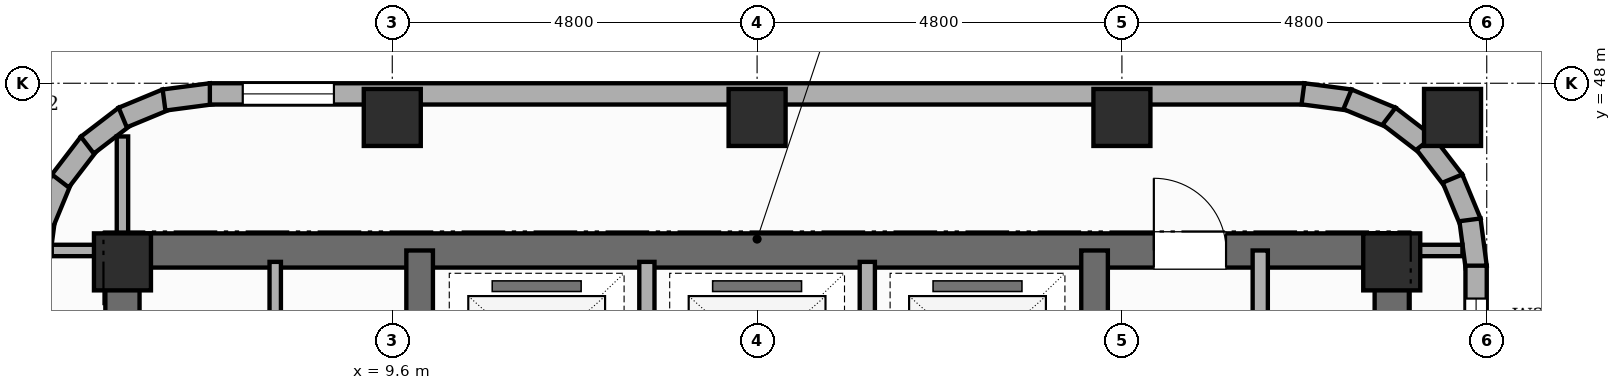
"""IFC4 building model, lengths in metres.
Left out: names, types, materials, properties, quantities, classifications, styles, units other than length and angle.
Written with IfcOpenShell. Run it as: python <this file> out.ifc"""

import sys

from ifc_helpers import new_model, si_unit, direction, frame, frame_2d, origin, origin_2d, place, context, subcontext, project, spatial, rectangle, extrude, element, fill, save


model = new_model("IFC4")
c1 = context("Model", 3, precision=1e-05, world=origin(), true_north=direction((0.0, 1.0)))
c2 = subcontext(c1, "Body", "Model", "MODEL_VIEW")
j1 = project(units=[si_unit("LENGTHUNIT", "METRE"), si_unit("PLANEANGLEUNIT", "RADIAN")], contexts=[c1])
p1 = place(None, origin())
s1 = spatial("IfcSite", under=j1, at=p1, CompositionType="ELEMENT")
p2 = place(p1, origin())
s2 = spatial("IfcBuilding", under=s1, at=p2, CompositionType="ELEMENT")
p3 = place(p2, frame((0.0, 0.0, 265.6)))
s3 = spatial("IfcBuildingStorey", under=s2, at=p3, CompositionType="ELEMENT", Elevation=265.6)
p4 = place(p3, frame((6.05, 30.675, 0.0), z_axis=(0.0, 0.0, 1.0), x_axis=(0.0, 1.0, 0.0)))
e1 = element("IfcWall", 1, at=p4, inside=s3, PredefinedType="SHEAR", context=c2, shape_type="SweptSolid", body=[
    extrude(rectangle(XDim=15.35, YDim=0.45, at=frame_2d((7.675, 0.0))), origin(), (0.0, 0.0, 1.0), 4.3),
])
p5 = place(p4, frame((10.675, 0.0, 0.0)))
e2 = element("IfcOpeningElement", 2, at=p5, cuts=e1, PredefinedType="OPENING", context=c2, shape_type="SweptSolid", body=[
    extrude(rectangle(XDim=0.95, YDim=2.15, at=frame_2d((0.475, 1.075))), frame((0.0, 0.235, 0.0), z_axis=(0.0, -1.0, 0.0), x_axis=(1.0, 0.0, 0.0)), (0.0, 0.0, 1.0), 0.47),
])
p6 = place(p3, frame((22.75, 30.675, 0.0), z_axis=(0.0, 0.0, 1.0), x_axis=(0.0, 1.0, 0.0)))
e3 = element("IfcWall", 3, at=p6, inside=s3, PredefinedType="SHEAR", context=c2, shape_type="SweptSolid", body=[
    extrude(rectangle(XDim=15.35, YDim=0.45, at=frame_2d((7.675, 0.0))), origin(), (0.0, 0.0, 1.0), 4.3),
])
p7 = place(p6, frame((10.675, 0.0, 0.0)))
e4 = element("IfcOpeningElement", 4, at=p7, cuts=e3, PredefinedType="OPENING", context=c2, shape_type="SweptSolid", body=[
    extrude(rectangle(XDim=1.0, YDim=2.15, at=frame_2d((0.5, 1.075))), frame((0.0, 0.235, 0.0), z_axis=(0.0, -1.0, 0.0), x_axis=(1.0, 0.0, 0.0)), (0.0, 0.0, 1.0), 0.47),
])
p8 = place(p3, frame((6.05, 45.8, 0.0), z_axis=(0.0, 0.0, 1.0), x_axis=(1.0, 0.0, 0.0)))
e5 = element("IfcWall", 5, at=p8, inside=s3, PredefinedType="SHEAR", context=c2, shape_type="SweptSolid", body=[
    extrude(rectangle(XDim=16.7, YDim=0.45, at=frame_2d((8.35, 0.0))), origin(), (0.0, 0.0, 1.0), 4.3),
])
p9 = place(p8, frame((13.57, 0.0, 0.0)))
e6 = element("IfcOpeningElement", 6, at=p9, cuts=e5, PredefinedType="OPENING", context=c2, shape_type="SweptSolid", body=[
    extrude(rectangle(XDim=0.95, YDim=2.15, at=frame_2d((0.475, 1.075))), frame((0.0, 0.235, 0.0), z_axis=(0.0, -1.0, 0.0), x_axis=(1.0, 0.0, 0.0)), (0.0, 0.0, 1.0), 0.47),
])
p10 = place(p3, frame((9.96, 30.9, 0.0), z_axis=(0.0, 0.0, 1.0), x_axis=(0.0, 1.0, 0.0)))
e7 = element("IfcWall", 7, at=p10, inside=s3, PredefinedType="SHEAR", context=c2, shape_type="SweptSolid", body=[
    extrude(rectangle(XDim=14.9, YDim=0.35, at=frame_2d((7.45, 0.0))), origin(), (0.0, 0.0, 1.0), 4.3),
])
p11 = place(p10, frame((0.65, 0.0, 0.0)))
e8 = element("IfcOpeningElement", 8, at=p11, cuts=e7, PredefinedType="OPENING", context=c2, shape_type="SweptSolid", body=[
    extrude(rectangle(XDim=0.95, YDim=2.1, at=frame_2d((0.475, 1.05))), frame((0.0, 0.185, 0.0), z_axis=(0.0, -1.0, 0.0), x_axis=(1.0, 0.0, 0.0)), (0.0, 0.0, 1.0), 0.37),
])
p12 = place(p10, frame((10.45, 0.0, 0.0)))
e9 = element("IfcOpeningElement", 9, at=p12, cuts=e7, PredefinedType="OPENING", context=c2, shape_type="SweptSolid", body=[
    extrude(rectangle(XDim=1.0, YDim=2.15, at=frame_2d((0.5, 1.075))), frame((0.0, 0.185, 0.0), z_axis=(0.0, -1.0, 0.0), x_axis=(1.0, 0.0, 0.0)), (0.0, 0.0, 1.0), 0.37),
])
p13 = place(p3, frame((18.84, 30.9, 0.0), z_axis=(0.0, 0.0, 1.0), x_axis=(0.0, 1.0, 0.0)))
e10 = element("IfcWall", 10, at=p13, inside=s3, PredefinedType="SHEAR", context=c2, shape_type="SweptSolid", body=[
    extrude(rectangle(XDim=14.9, YDim=0.35, at=frame_2d((7.45, 0.0))), origin(), (0.0, 0.0, 1.0), 4.3),
])
p14 = place(p13, frame((0.65, 0.0, 0.0)))
e11 = element("IfcOpeningElement", 11, at=p14, cuts=e10, PredefinedType="OPENING", context=c2, shape_type="SweptSolid", body=[
    extrude(rectangle(XDim=0.95, YDim=2.1, at=frame_2d((0.475, 1.05))), frame((0.0, 0.185, 0.0), z_axis=(0.0, -1.0, 0.0), x_axis=(1.0, 0.0, 0.0)), (0.0, 0.0, 1.0), 0.37),
])
p15 = place(p13, frame((10.45, 0.0, 0.0)))
e12 = element("IfcOpeningElement", 12, at=p15, cuts=e10, PredefinedType="OPENING", context=c2, shape_type="SweptSolid", body=[
    extrude(rectangle(XDim=1.0, YDim=2.15, at=frame_2d((0.5, 1.075))), frame((0.0, 0.185, 0.0), z_axis=(0.0, -1.0, 0.0), x_axis=(1.0, 0.0, 0.0)), (0.0, 0.0, 1.0), 0.37),
])
for number, where, z_axis, x_axis in (
    (13, (6.05, 45.65, 0.0), (0.0, 0.0, 1.0), (1.0, 0.0, 0.0)),
    (14, (9.6, 47.55, 0.0), (0.0, 0.0, 1.0), (1.0, 0.0, 0.0)),
    (15, (14.4, 47.55, 0.0), (0.0, 0.0, 1.0), (1.0, 0.0, 0.0)),
    (16, (19.2, 47.55, 0.0), (0.0, 0.0, 1.0), (1.0, 0.0, 0.0)),
    (17, (22.75, 45.65, 0.0), (0.0, 0.0, 1.0), (1.0, 0.0, 0.0)),
    (18, (23.55, 47.55, 0.0), (0.0, 0.0, 1.0), (1.0, 0.0, 0.0)),
):
    element("IfcColumn", number, at=place(p3, frame(where, z_axis=z_axis, x_axis=x_axis)), inside=s3, PredefinedType="COLUMN", context=c2, shape_type="SweptSolid", body=[
        extrude(rectangle(XDim=0.75, YDim=0.75, at=origin_2d()), origin(), (0.0, 0.0, 1.0), 4.3),
    ])
for number, where, z_axis, x_axis in (
    (19, (4.939, 45.582, 0.0), (0.0, 0.0, 1.0), (0.131, 0.991, 0.0)),
    (20, (5.011, 46.167, 0.0), (0.0, 0.0, 1.0), (0.383, 0.924, 0.0)),
    (21, (5.233, 46.715, 0.0), (0.0, 0.0, 1.0), (0.609, 0.793, 0.0)),
    (22, (5.588, 47.186, 0.0), (0.0, 0.0, 1.0), (0.793, 0.609, 0.0)),
):
    element("IfcWall", number, at=place(p3, frame(where, z_axis=z_axis, x_axis=x_axis)), inside=s3, PredefinedType="STANDARD", context=c2, shape_type="SweptSolid", body=[
        extrude(rectangle(XDim=0.626, YDim=0.28, at=frame_2d((0.313, 0.0))), origin(), (0.0, 0.0, 1.0), 4.04),
    ])
p16 = place(p3, frame((6.054, 47.549, 0.0), z_axis=(0.0, 0.0, 1.0), x_axis=(0.923974080304, 0.382455093999, 0.0)))
e23 = element("IfcWall", 23, at=p16, inside=s3, PredefinedType="STANDARD", context=c2, shape_type="SweptSolid", body=[
    extrude(rectangle(XDim=0.626, YDim=0.28, at=frame_2d((0.313, 0.0))), origin(), (0.0, 0.0, 1.0), 4.04),
])
p17 = place(p3, frame((6.597, 47.779, 0.0), z_axis=(0.0, 0.0, 1.0), x_axis=(0.9914410257, 0.130555323746, 0.0)))
e24 = element("IfcWall", 24, at=p17, inside=s3, PredefinedType="STANDARD", context=c2, shape_type="SweptSolid", body=[
    extrude(rectangle(XDim=0.626, YDim=0.28, at=frame_2d((0.313, 0.0))), origin(), (0.0, 0.0, 1.0), 4.04),
])
p18 = place(p3, frame((7.2, 47.86, 0.0), z_axis=(0.0, 0.0, 1.0), x_axis=(1.0, 0.0, 0.0)))
e25 = element("IfcWall", 25, at=p18, inside=s3, PredefinedType="STANDARD", context=c2, shape_type="SweptSolid", body=[
    extrude(rectangle(XDim=14.4, YDim=0.28, at=frame_2d((7.2, 0.0))), origin(), (0.0, 0.0, 1.0), 3.32),
])
p19 = place(p18, frame((0.433, 0.0, 0.8)))
e26 = element("IfcOpeningElement", 26, at=p19, cuts=e25, PredefinedType="OPENING", context=c2, shape_type="SweptSolid", body=[
    extrude(rectangle(XDim=1.2, YDim=1.8, at=frame_2d((0.6, 0.9))), frame((0.0, 0.15, 0.0), z_axis=(0.0, -1.0, 0.0), x_axis=(1.0, 0.0, 0.0)), (0.0, 0.0, 1.0), 0.3),
])
for number, where, z_axis, x_axis in (
    (27, (21.582, 47.861, 0.0), (0.0, 0.0, 1.0), (0.991, -0.131, 0.0)),
    (28, (22.167, 47.789, 0.0), (0.0, 0.0, 1.0), (0.924, -0.382, 0.0)),
    (29, (22.715, 47.567, 0.0), (0.0, 0.0, 1.0), (0.793, -0.609, 0.0)),
    (30, (23.186, 47.212, 0.0), (0.0, 0.0, 1.0), (0.609, -0.793, 0.0)),
    (31, (23.549, 46.746, 0.0), (0.0, 0.0, 1.0), (0.382, -0.924, 0.0)),
    (32, (23.779, 46.203, 0.0), (0.0, 0.0, 1.0), (0.131, -0.991, 0.0)),
):
    element("IfcWall", number, at=place(p3, frame(where, z_axis=z_axis, x_axis=x_axis)), inside=s3, PredefinedType="STANDARD", context=c2, shape_type="SweptSolid", body=[
        extrude(rectangle(XDim=0.626, YDim=0.28, at=frame_2d((0.313, 0.0))), origin(), (0.0, 0.0, 1.0), 3.32),
    ])
p20 = place(p3, frame((23.86, 45.6, 0.0), z_axis=(0.0, 0.0, 1.0), x_axis=(0.0, -1.0, 0.0)))
e33 = element("IfcWall", 33, at=p20, inside=s3, PredefinedType="STANDARD", context=c2, shape_type="SweptSolid", body=[
    extrude(rectangle(XDim=32.4, YDim=0.28, at=frame_2d((16.2, 0.0))), origin(), (0.0, 0.0, 1.0), 3.32),
])
p21 = place(p20, frame((28.5, 0.0, 0.0)))
e34 = element("IfcOpeningElement", 34, at=p21, cuts=e33, PredefinedType="OPENING", context=c2, shape_type="SweptSolid", body=[
    extrude(rectangle(XDim=1.1, YDim=2.15, at=frame_2d((0.55, 1.075))), frame((0.0, 0.15, 0.0), z_axis=(0.0, -1.0, 0.0), x_axis=(1.0, 0.0, 0.0)), (0.0, 0.0, 1.0), 0.3),
])
p22 = place(p20, frame((29.95, 0.0, 0.45)))
e35 = element("IfcOpeningElement", 35, at=p22, cuts=e33, PredefinedType="OPENING", context=c2, shape_type="SweptSolid", body=[
    extrude(rectangle(XDim=0.6, YDim=1.8, at=frame_2d((0.3, 0.9))), frame((0.0, 0.15, 0.0), z_axis=(0.0, -1.0, 0.0), x_axis=(1.0, 0.0, 0.0)), (0.0, 0.0, 1.0), 0.3),
])
p23 = place(p20, frame((22.829, 0.0, 0.8)))
e36 = element("IfcOpeningElement", 36, at=p23, cuts=e33, PredefinedType="OPENING", context=c2, shape_type="SweptSolid", body=[
    extrude(rectangle(XDim=2.05, YDim=1.95, at=frame_2d((1.025, 0.975))), frame((0.0, 0.15, 0.0), z_axis=(0.0, -1.0, 0.0), x_axis=(1.0, 0.0, 0.0)), (0.0, 0.0, 1.0), 0.3),
])
p24 = place(p20, frame((0.433, 0.0, 0.8)))
e37 = element("IfcOpeningElement", 37, at=p24, cuts=e33, PredefinedType="OPENING", context=c2, shape_type="SweptSolid", body=[
    extrude(rectangle(XDim=1.2, YDim=1.8, at=frame_2d((0.6, 0.9))), frame((0.0, 0.15, 0.0), z_axis=(0.0, -1.0, 0.0), x_axis=(1.0, 0.0, 0.0)), (0.0, 0.0, 1.0), 0.3),
])
p25 = place(p20, frame((27.076, 0.0, 0.45)))
e38 = element("IfcOpeningElement", 38, at=p25, cuts=e33, PredefinedType="OPENING", context=c2, shape_type="SweptSolid", body=[
    extrude(rectangle(XDim=0.75, YDim=1.8, at=frame_2d((0.375, 0.9))), frame((0.0, 0.15, 0.0), z_axis=(0.0, -1.0, 0.0), x_axis=(1.0, 0.0, 0.0)), (0.0, 0.0, 1.0), 0.3),
])
p26 = place(p20, frame((20.167, 0.0, 0.45)))
e39 = element("IfcOpeningElement", 39, at=p26, cuts=e33, PredefinedType="OPENING", context=c2, shape_type="SweptSolid", body=[
    extrude(rectangle(XDim=0.75, YDim=1.8, at=frame_2d((0.375, 0.9))), frame((0.0, 0.15, 0.0), z_axis=(0.0, -1.0, 0.0), x_axis=(1.0, 0.0, 0.0)), (0.0, 0.0, 1.0), 0.3),
])
p27 = place(p3, frame((21.02, 43.05, 0.0), z_axis=(0.0, 0.0, 1.0), x_axis=(0.0, 1.0, 0.0)))
e40 = element("IfcWall", 40, at=p27, inside=s3, PredefinedType="POLYGONAL", context=c2, shape_type="SweptSolid", body=[
    extrude(rectangle(XDim=2.75, YDim=0.2, at=frame_2d((1.375, 0.0))), origin(), (0.0, 0.0, 1.0), 4.04),
])
p28 = place(p27, frame((0.7, 0.0, 0.0)))
e41 = element("IfcOpeningElement", 41, at=p28, cuts=e40, PredefinedType="OPENING", context=c2, shape_type="SweptSolid", body=[
    extrude(rectangle(XDim=0.86, YDim=2.1, at=frame_2d((0.43, 1.05))), frame((0.0, 0.11, 0.0), z_axis=(0.0, -1.0, 0.0), x_axis=(1.0, 0.0, 0.0)), (0.0, 0.0, 1.0), 0.22),
])
for number, where, z_axis, x_axis in (
    (42, (12.95, 43.1, 0.0), (0.0, 0.0, 1.0), (0.0, 1.0, 0.0)),
    (43, (15.85, 43.1, 0.0), (0.0, 0.0, 1.0), (0.0, 1.0, 0.0)),
):
    element("IfcWall", number, at=place(p3, frame(where, z_axis=z_axis, x_axis=x_axis)), inside=s3, PredefinedType="POLYGONAL", context=c2, shape_type="SweptSolid", body=[
        extrude(rectangle(XDim=2.55, YDim=0.2, at=frame_2d((1.275, 0.0))), origin(), (0.0, 0.0, 1.0), 4.04),
    ])
p29 = place(p3, frame((8.06, 43.05, 0.0), z_axis=(0.0, 0.0, 1.0), x_axis=(0.0, 1.0, 0.0)))
e44 = element("IfcWall", 44, at=p29, inside=s3, PredefinedType="PARTITIONING", context=c2, shape_type="SweptSolid", body=[
    extrude(rectangle(XDim=2.6, YDim=0.15, at=frame_2d((1.3, 0.0))), origin(), (0.0, 0.0, 1.0), 4.04),
])
p30 = place(p3, frame((5.12, 45.8, 0.0), z_axis=(0.0, 0.0, 1.0), x_axis=(1.0, 0.0, 0.0)))
e45 = element("IfcWall", 45, at=p30, inside=s3, PredefinedType="PARTITIONING", context=c2, shape_type="SweptSolid", body=[
    extrude(rectangle(XDim=0.93, YDim=0.15, at=frame_2d((0.465, 0.0))), origin(), (0.0, 0.0, 1.0), 4.04),
])
p31 = place(p3, frame((6.05, 45.8, 0.0), z_axis=(0.0, 0.0, 1.0), x_axis=(0.0, 1.0, 0.0)))
e46 = element("IfcWall", 46, at=p31, inside=s3, PredefinedType="PARTITIONING", context=c2, shape_type="SweptSolid", body=[
    extrude(rectangle(XDim=1.5, YDim=0.15, at=frame_2d((0.75, 0.0))), origin(), (0.0, 0.0, 1.0), 4.04),
])
p32 = place(p3, frame((22.75, 45.8, 0.0), z_axis=(0.0, 0.0, 1.0), x_axis=(1.0, 0.0, 0.0)))
e47 = element("IfcWall", 47, at=p32, inside=s3, PredefinedType="PARTITIONING", context=c2, shape_type="SweptSolid", body=[
    extrude(rectangle(XDim=0.93, YDim=0.15, at=frame_2d((0.465, 0.0))), origin(), (0.0, 0.0, 1.0), 4.04),
])
p33 = place(p19, origin())
e48 = element("IfcWindow", 48, at=p33, inside=s3, PartitioningType="SINGLE_PANEL", PredefinedType="WINDOW", context=c2, shape_type="SweptSolid", body=[
    extrude(rectangle(XDim=1.2, YDim=1.8, at=frame_2d((0.6, 0.9))), frame((0.0, 0.03, 0.0), z_axis=(0.0, -1.0, 0.0), x_axis=(1.0, 0.0, 0.0)), (0.0, 0.0, 1.0), 0.06),
])
fill(e26, e48)
p34 = place(p24, origin())
e49 = element("IfcWindow", 49, at=p34, inside=s3, PartitioningType="SINGLE_PANEL", PredefinedType="WINDOW", context=c2, shape_type="SweptSolid", body=[
    extrude(rectangle(XDim=1.2, YDim=1.8, at=frame_2d((0.6, 0.9))), frame((0.0, 0.03, 0.0), z_axis=(0.0, -1.0, 0.0), x_axis=(1.0, 0.0, 0.0)), (0.0, 0.0, 1.0), 0.06),
])
fill(e37, e49)
p35 = place(p9, origin())
e50 = element("IfcDoor", 50, at=p35, inside=s3, OperationType="SINGLE_SWING_LEFT", PredefinedType="DOOR", context=c2, shape_type="SweptSolid", body=[
    extrude(rectangle(XDim=0.95, YDim=2.15, at=frame_2d((0.475, 1.075))), frame((0.0, 0.025, 0.0), z_axis=(0.0, -1.0, 0.0), x_axis=(1.0, 0.0, 0.0)), (0.0, 0.0, 1.0), 0.05),
])
fill(e6, e50)
save(model, sys.argv[1])
